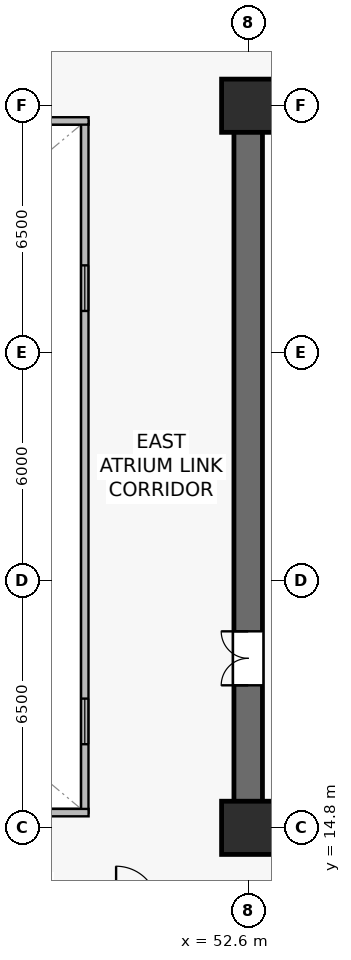
"""IFC4 building model, lengths in metres.
Left out: names, types, materials, properties, quantities, classifications, styles, units other than length and angle.
Written with IfcOpenShell. Run it as: python <this file> out.ifc"""

import sys

from ifc_helpers import new_model, si_unit, direction, frame, frame_2d, origin, origin_2d, place, context, subcontext, project, spatial, rectangle, extrude, source, transform, mapped, element, fill, save


model = new_model("IFC4")
c1 = context("Model", 3, precision=1e-05, world=origin(), true_north=direction((0.0, 1.0)))
c2 = subcontext(c1, "Body", "Model", "MODEL_VIEW")
j1 = project(units=[si_unit("LENGTHUNIT", "METRE"), si_unit("PLANEANGLEUNIT", "RADIAN")], contexts=[c1])
p1 = place(None, origin())
s1 = spatial("IfcSite", under=j1, at=p1, CompositionType="ELEMENT")
p2 = place(p1, origin())
s2 = spatial("IfcBuilding", under=s1, at=p2, CompositionType="ELEMENT")
p3 = place(p2, frame((0.0, 0.0, 62.1)))
s3 = spatial("IfcBuildingStorey", under=s2, at=p3, CompositionType="ELEMENT", Elevation=62.1)
p4 = place(p3, frame((52.225, 14.8, 0.0), z_axis=(0.0, 0.0, 1.0), x_axis=(1.0, 0.0, 0.0)))
e1 = element("IfcWall", 1, at=p4, inside=s3, PredefinedType="SHEAR", context=c2, shape_type="SweptSolid", body=[
    extrude(rectangle(XDim=15.55, YDim=0.75, at=frame_2d((7.775, 0.0))), origin(), (0.0, 0.0, 1.0), 3.78),
])
p5 = place(p3, frame((52.225, 33.8, 0.0), z_axis=(0.0, 0.0, 1.0), x_axis=(1.0, 0.0, 0.0)))
e2 = element("IfcWall", 2, at=p5, inside=s3, PredefinedType="SHEAR", context=c2, shape_type="SweptSolid", body=[
    extrude(rectangle(XDim=15.55, YDim=0.75, at=frame_2d((7.775, 0.0))), origin(), (0.0, 0.0, 1.0), 3.78),
])
p6 = place(p5, frame((8.875, 0.0, 0.0)))
e3 = element("IfcOpeningElement", 3, at=p6, cuts=e2, PredefinedType="OPENING", context=c2, shape_type="SweptSolid", body=[
    extrude(rectangle(XDim=0.95, YDim=2.15, at=frame_2d((0.475, 1.075))), frame((0.0, 0.385, 0.0), z_axis=(0.0, -1.0, 0.0), x_axis=(1.0, 0.0, 0.0)), (0.0, 0.0, 1.0), 0.77),
])
p7 = place(p5, frame((5.51, 0.0, 0.0)))
e4 = element("IfcOpeningElement", 4, at=p7, cuts=e2, PredefinedType="OPENING", context=c2, shape_type="SweptSolid", body=[
    extrude(rectangle(XDim=0.95, YDim=2.15, at=frame_2d((0.475, 1.075))), frame((0.0, 0.385, 0.0), z_axis=(0.0, -1.0, 0.0), x_axis=(1.0, 0.0, 0.0)), (0.0, 0.0, 1.0), 0.77),
])
p8 = place(p5, frame((2.11, 0.0, 0.0)))
e5 = element("IfcOpeningElement", 5, at=p8, cuts=e2, PredefinedType="OPENING", context=c2, shape_type="SweptSolid", body=[
    extrude(rectangle(XDim=0.95, YDim=2.15, at=frame_2d((0.475, 1.075))), frame((0.0, 0.385, 0.0), z_axis=(0.0, -1.0, 0.0), x_axis=(1.0, 0.0, 0.0)), (0.0, 0.0, 1.0), 0.77),
])
p9 = place(p3, frame((52.6, 15.175, 0.0), z_axis=(0.0, 0.0, 1.0), x_axis=(0.0, 1.0, 0.0)))
e6 = element("IfcWall", 6, at=p9, inside=s3, PredefinedType="SHEAR", context=c2, shape_type="SweptSolid", body=[
    extrude(rectangle(XDim=18.25, YDim=0.75, at=frame_2d((9.125, 0.0))), origin(), (0.0, 0.0, 1.0), 3.78),
])
p10 = place(p9, frame((3.375, 0.0, 0.0)))
e7 = element("IfcOpeningElement", 7, at=p10, cuts=e6, PredefinedType="OPENING", context=c2, shape_type="SweptSolid", body=[
    extrude(rectangle(XDim=1.42, YDim=2.2, at=frame_2d((0.71, 1.1))), frame((0.0, 0.385, 0.0), z_axis=(0.0, -1.0, 0.0), x_axis=(1.0, 0.0, 0.0)), (0.0, 0.0, 1.0), 0.77),
])
m1 = source(origin(), c2, "Body", "SweptSolid", [
    extrude(rectangle(XDim=1.4, YDim=1.4, at=origin_2d()), origin(), (0.0, 0.0, 1.0), 4.1),
])
for number, where, z_axis, x_axis in (
    (8, (52.6, 14.8, 0.0), (0.0, 0.0, 1.0), (1.0, 0.0, 0.0)),
    (9, (52.6, 33.8, 0.0), (0.0, 0.0, 1.0), (1.0, 0.0, 0.0)),
):
    element("IfcColumn", number, at=place(p3, frame(where, z_axis=z_axis, x_axis=x_axis)), inside=s3, PredefinedType="COLUMN", context=c2, shape_type="MappedRepresentation", body=[
        mapped(m1, transform((0.0, 0.0, 0.0), scale=1.0)),
    ])
p11 = place(p3, frame((48.3, 15.2, 0.0), z_axis=(0.0, 0.0, 1.0), x_axis=(0.0, 1.0, 0.0)))
e10 = element("IfcWall", 10, at=p11, inside=s3, PredefinedType="SOLIDWALL", context=c2, shape_type="SweptSolid", body=[
    extrude(rectangle(XDim=18.2, YDim=0.195, at=frame_2d((9.1, 0.0))), origin(), (0.0, 0.0, 1.0), 3.78),
])
p12 = place(p11, frame((1.8, 0.0, 0.9)))
e11 = element("IfcOpeningElement", 11, at=p12, cuts=e10, PredefinedType="OPENING", context=c2, shape_type="SweptSolid", body=[
    extrude(rectangle(XDim=1.2, YDim=1.35, at=frame_2d((0.6, 0.675))), frame((0.0, 0.107, 0.0), z_axis=(0.0, -1.0, 0.0), x_axis=(1.0, 0.0, 0.0)), (0.0, 0.0, 1.0), 0.215),
])
p13 = place(p11, frame((13.2, 0.0, 0.9)))
e12 = element("IfcOpeningElement", 12, at=p13, cuts=e10, PredefinedType="OPENING", context=c2, shape_type="SweptSolid", body=[
    extrude(rectangle(XDim=1.2, YDim=1.35, at=frame_2d((0.6, 0.675))), frame((0.0, 0.107, 0.0), z_axis=(0.0, -1.0, 0.0), x_axis=(1.0, 0.0, 0.0)), (0.0, 0.0, 1.0), 0.215),
])
for number, where, z_axis, x_axis in (
    (13, (26.4, 15.2, 0.0), (0.0, 0.0, 1.0), (1.0, 0.0, 0.0)),
    (14, (26.4, 33.4, 0.0), (0.0, 0.0, 1.0), (1.0, 0.0, 0.0)),
):
    element("IfcWall", number, at=place(p3, frame(where, z_axis=z_axis, x_axis=x_axis)), inside=s3, PredefinedType="SOLIDWALL", context=c2, shape_type="SweptSolid", body=[
        extrude(rectangle(XDim=22.0, YDim=0.195, at=frame_2d((11.0, 0.0))), origin(), (0.0, 0.0, 1.0), 3.78),
    ])
m2 = source(origin(), c2, "Body", "SweptSolid", [
    extrude(rectangle(XDim=1.2, YDim=1.35, at=frame_2d((0.6, 0.675))), frame((0.0, 0.03, 0.0), z_axis=(0.0, -1.0, 0.0), x_axis=(1.0, 0.0, 0.0)), (0.0, 0.0, 1.0), 0.06),
])
p14 = place(p12, origin())
e15 = element("IfcWindow", 15, at=p14, inside=s3, PartitioningType="SINGLE_PANEL", PredefinedType="WINDOW", context=c2, shape_type="MappedRepresentation", body=[
    mapped(m2, transform((0.0, 0.0, 0.0), scale=1.0)),
])
fill(e11, e15)
p15 = place(p13, origin())
e16 = element("IfcWindow", 16, at=p15, inside=s3, PartitioningType="SINGLE_PANEL", PredefinedType="WINDOW", context=c2, shape_type="MappedRepresentation", body=[
    mapped(m2, transform((0.0, 0.0, 0.0), scale=1.0)),
])
fill(e12, e16)
m3 = source(origin(), c2, "Body", "SweptSolid", [
    extrude(rectangle(XDim=1.42, YDim=2.2, at=frame_2d((0.71, 1.1))), frame((0.0, 0.025, 0.0), z_axis=(0.0, -1.0, 0.0), x_axis=(1.0, 0.0, 0.0)), (0.0, 0.0, 1.0), 0.05),
])
p16 = place(p10, origin())
e17 = element("IfcDoor", 17, at=p16, inside=s3, OperationType="DOUBLE_DOOR_SINGLE_SWING", PredefinedType="DOOR", context=c2, shape_type="MappedRepresentation", body=[
    mapped(m3, transform((0.0, 0.0, 0.0), scale=1.0)),
])
fill(e7, e17)
save(model, sys.argv[1])
